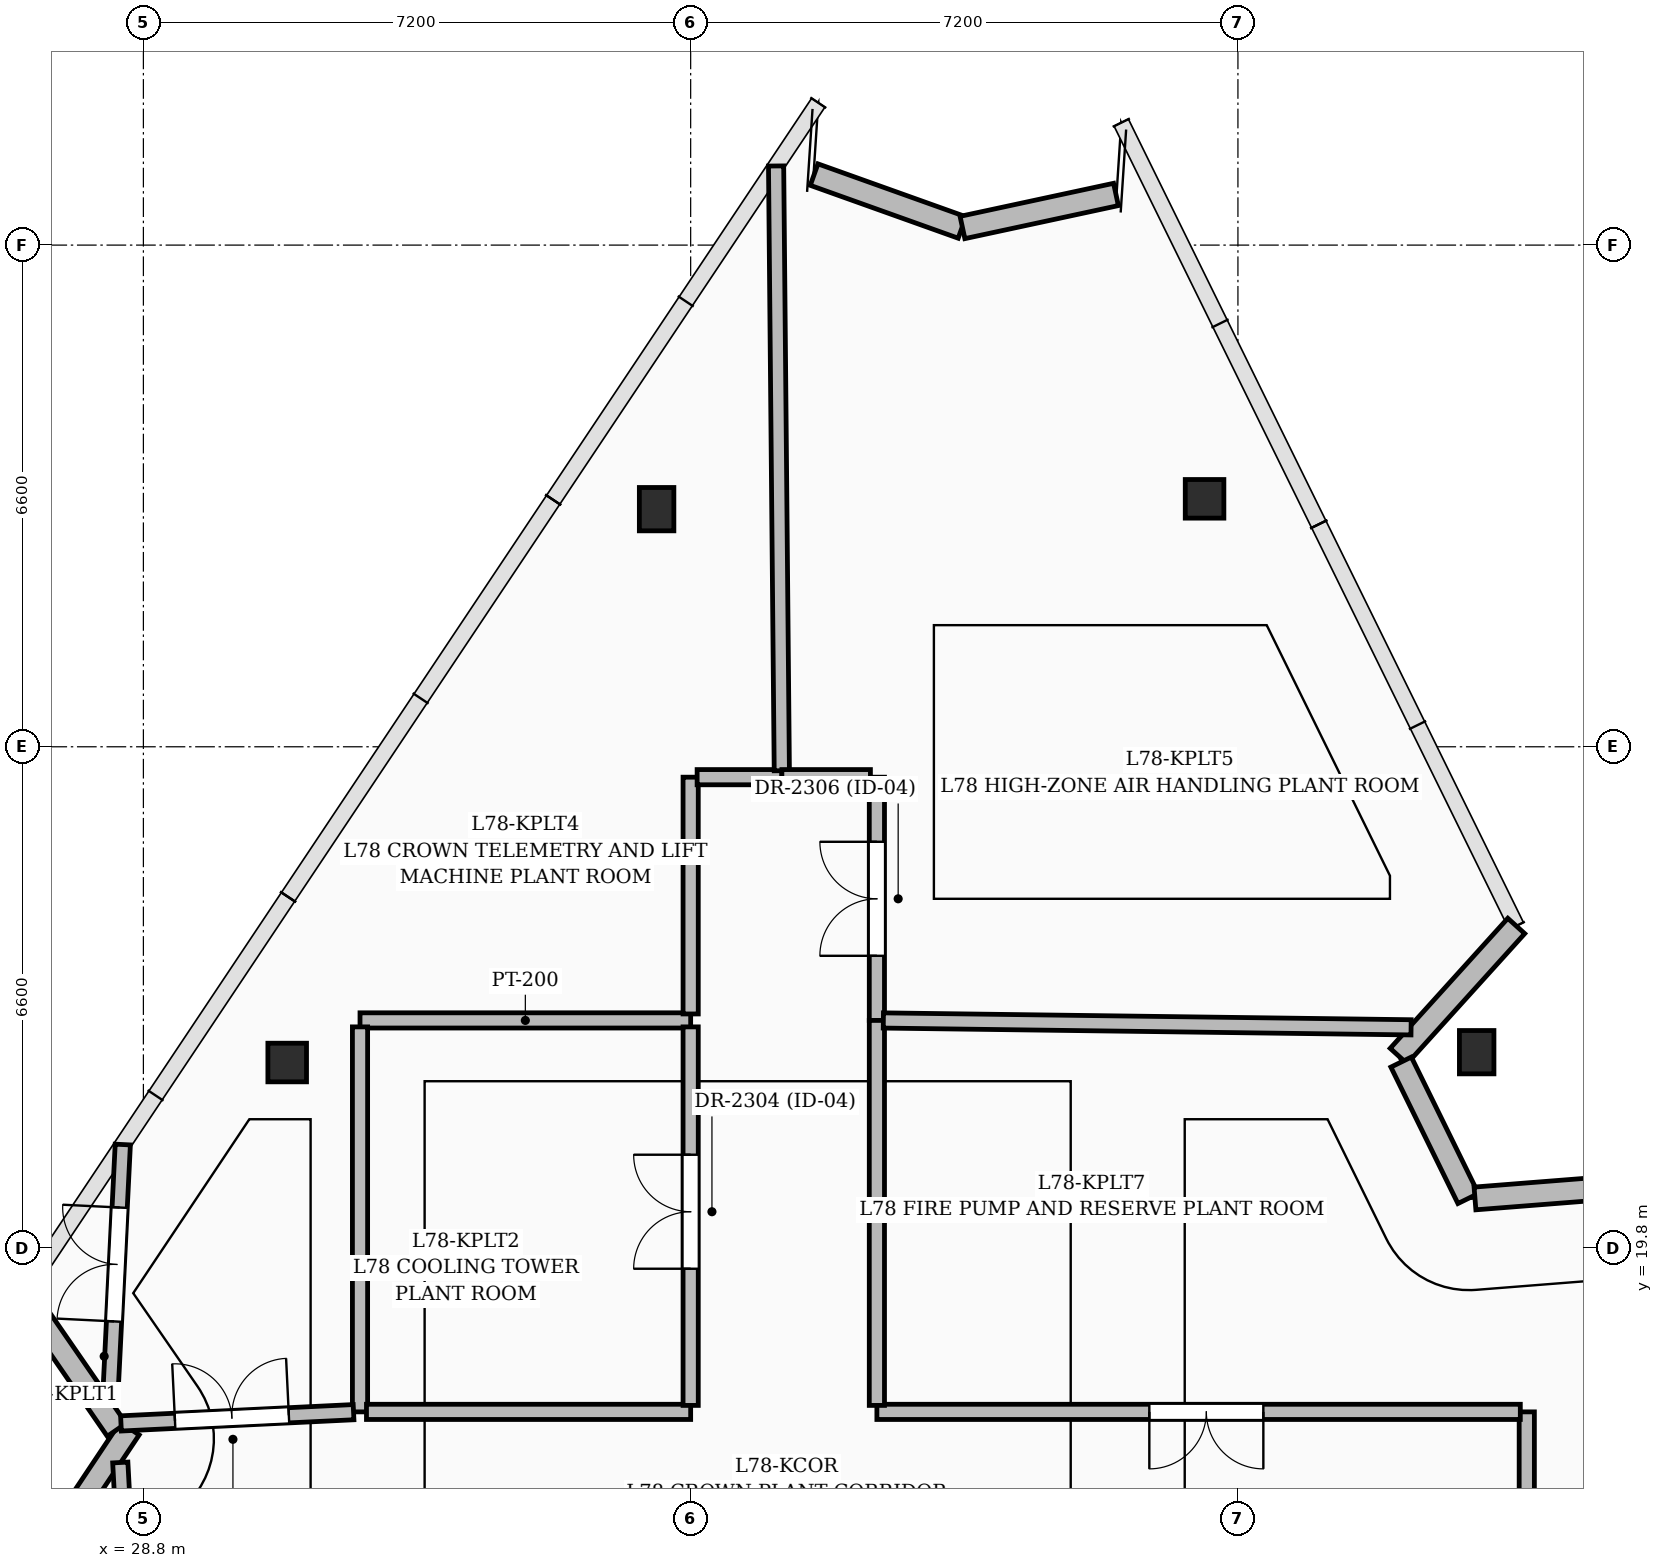
"""IFC4 building model, lengths in metres.
Left out: names, types, materials, properties, quantities, classifications, styles, units other than length and angle.
Written with IfcOpenShell. Run it as: python <this file> out.ifc"""

import sys

from ifc_helpers import new_model, si_unit, direction, frame, frame_2d, origin, origin_2d, place, context, subcontext, project, spatial, rectangle, hollow_circle, i_section, extrude, element, fill, save


model = new_model("IFC4")
c1 = context("Model", 3, precision=1e-05, world=origin(), true_north=direction((0.0, 1.0)))
c2 = subcontext(c1, "Body", "Model", "MODEL_VIEW")
j1 = project(units=[si_unit("LENGTHUNIT", "METRE"), si_unit("PLANEANGLEUNIT", "RADIAN")], contexts=[c1])
p1 = place(None, origin())
s1 = spatial("IfcSite", under=j1, at=p1, CompositionType="ELEMENT")
p2 = place(p1, origin())
s2 = spatial("IfcBuilding", under=s1, at=p2, CompositionType="ELEMENT")
p3 = place(p2, frame((0.0, 0.0, 302.5)))
s3 = spatial("IfcBuildingStorey", under=s2, at=p3, CompositionType="ELEMENT", Elevation=302.5)
p4 = place(p3, frame((46.341, 22.382, 0.0), z_axis=(0.0, 0.0, 1.0), x_axis=(1.0, 0.0, 0.0)))
e1 = element("IfcColumn", 1, at=p4, inside=s3, PredefinedType="COLUMN", context=c2, shape_type="SweptSolid", body=[
    extrude(i_section(OverallWidth=0.454, OverallDepth=0.57, WebThickness=0.078, FlangeThickness=0.094, FilletRadius=0.02, at=origin_2d()), origin(), (0.0, 0.0, 1.0), 4.0),
])
p5 = place(p3, frame((42.761, 29.662, 0.0), z_axis=(0.0, 0.0, 1.0), x_axis=(1.0, 0.0, 0.0)))
e2 = element("IfcColumn", 2, at=p5, inside=s3, PredefinedType="COLUMN", context=c2, shape_type="SweptSolid", body=[
    extrude(hollow_circle(Radius=0.254, WallThickness=0.016, at=origin_2d()), origin(), (0.0, 0.0, 1.0), 4.0),
])
p6 = place(p3, frame((35.552, 29.526, 0.0), z_axis=(0.0, 0.0, 1.0), x_axis=(1.0, 0.0, 0.0)))
e3 = element("IfcColumn", 3, at=p6, inside=s3, PredefinedType="COLUMN", context=c2, shape_type="SweptSolid", body=[
    extrude(i_section(OverallWidth=0.454, OverallDepth=0.57, WebThickness=0.078, FlangeThickness=0.094, FilletRadius=0.02, at=origin_2d()), origin(), (0.0, 0.0, 1.0), 4.0),
])
p7 = place(p3, frame((30.692, 22.246, 0.0), z_axis=(0.0, 0.0, 1.0), x_axis=(1.0, 0.0, 0.0)))
e4 = element("IfcColumn", 4, at=p7, inside=s3, PredefinedType="COLUMN", context=c2, shape_type="SweptSolid", body=[
    extrude(hollow_circle(Radius=0.254, WallThickness=0.016, at=origin_2d()), origin(), (0.0, 0.0, 1.0), 4.0),
])
p8 = place(p3, frame((27.502, 15.756, 0.0), z_axis=(0.0, 0.0, 1.0), x_axis=(0.555175962623, 0.831732920189, 0.0)))
e5 = element("IfcWall", 5, at=p8, inside=s3, PredefinedType="SOLIDWALL", context=c2, shape_type="SweptSolid", body=[
    extrude(rectangle(XDim=2.013, YDim=0.3, at=frame_2d((1.006, 0.0))), origin(), (0.0, 0.0, 1.0), 3.04),
])
p9 = place(p3, frame((28.448, 17.414, 0.0), z_axis=(0.0, 0.0, 1.0), x_axis=(-0.56781706626, 0.823154772363, 0.0)))
e6 = element("IfcWall", 6, at=p9, inside=s3, PredefinedType="SOLIDWALL", context=c2, shape_type="SweptSolid", body=[
    extrude(rectangle(XDim=2.17, YDim=0.3, at=frame_2d((1.085, 0.0))), origin(), (0.0, 0.0, 1.0), 2.982),
])
p10 = place(p3, frame((37.624, 33.927, 0.0), z_axis=(0.0, 0.0, 1.0), x_axis=(0.941672407687, -0.336530944493, 0.0)))
e7 = element("IfcWall", 7, at=p10, inside=s3, PredefinedType="SOLIDWALL", context=c2, shape_type="SweptSolid", body=[
    extrude(rectangle(XDim=2.067, YDim=0.3, at=frame_2d((1.033, 0.0))), origin(), (0.0, 0.0, 1.0), 3.7),
])
p11 = place(p3, frame((39.576, 33.232, 0.0), z_axis=(0.0, 0.0, 1.0), x_axis=(0.977608338725, 0.210432735227, 0.0)))
e8 = element("IfcWall", 8, at=p11, inside=s3, PredefinedType="SOLIDWALL", context=c2, shape_type="SweptSolid", body=[
    extrude(rectangle(XDim=2.066, YDim=0.3, at=frame_2d((1.033, 0.0))), origin(), (0.0, 0.0, 1.0), 3.7),
])
p12 = place(p3, frame((46.862, 24.043, 0.0), z_axis=(0.0, 0.0, 1.0), x_axis=(-0.670758100891, -0.741676189512, 0.0)))
e9 = element("IfcWall", 9, at=p12, inside=s3, PredefinedType="SOLIDWALL", context=c2, shape_type="SweptSolid", body=[
    extrude(rectangle(XDim=2.307, YDim=0.3, at=frame_2d((1.153, 0.0))), origin(), (0.0, 0.0, 1.0), 2.982),
])
p13 = place(p3, frame((45.347, 22.252, 0.0), z_axis=(0.0, 0.0, 1.0), x_axis=(0.441098850586, -0.897458524954, 0.0)))
e10 = element("IfcWall", 10, at=p13, inside=s3, PredefinedType="SOLIDWALL", context=c2, shape_type="SweptSolid", body=[
    extrude(rectangle(XDim=2.0, YDim=0.3, at=frame_2d((1.0, 0.0))), origin(), (0.0, 0.0, 1.0), 3.7),
])
p14 = place(p3, frame((46.319, 20.458, 0.0), z_axis=(0.0, 0.0, 1.0), x_axis=(0.996897695967, 0.078708219233, 0.0)))
e11 = element("IfcWall", 11, at=p14, inside=s3, PredefinedType="SOLIDWALL", context=c2, shape_type="SweptSolid", body=[
    extrude(rectangle(XDim=2.227, YDim=0.3, at=frame_2d((1.114, 0.0))), origin(), (0.0, 0.0, 1.0), 2.982),
])
p15 = place(p3, frame((28.362, 17.795, 0.0), z_axis=(0.0, 0.0, 1.0), x_axis=(0.049461540964, 0.99877602893, 0.0)))
e12 = element("IfcWall", 12, at=p15, inside=s3, PredefinedType="PARTITIONING", context=c2, shape_type="SweptSolid", body=[
    extrude(rectangle(XDim=3.376, YDim=0.2, at=frame_2d((1.688, 0.0))), origin(), (0.0, 0.0, 1.0), 2.977),
])
p16 = place(p15, frame((1.046, 0.0, 0.0)))
e13 = element("IfcOpeningElement", 13, at=p16, cuts=e12, PredefinedType="OPENING", context=c2, shape_type="SweptSolid", body=[
    extrude(rectangle(XDim=1.5, YDim=2.2, at=frame_2d((0.75, 1.1))), frame((0.0, 0.11, 0.0), z_axis=(0.0, -1.0, 0.0), x_axis=(1.0, 0.0, 0.0)), (0.0, 0.0, 1.0), 0.22),
])
p17 = place(p3, frame((36.0, 22.8, 0.0), z_axis=(0.0, 0.0, 1.0), x_axis=(-1.0, 0.0, 0.0)))
e14 = element("IfcWall", 14, at=p17, inside=s3, PredefinedType="PARTITIONING", context=c2, shape_type="SweptSolid", body=[
    extrude(rectangle(XDim=4.35, YDim=0.2, at=frame_2d((2.175, 0.0))), origin(), (0.0, 0.0, 1.0), 3.035),
])
p18 = place(p3, frame((31.65, 22.715, 0.0), z_axis=(0.0, 0.0, 1.0), x_axis=(0.0, -1.0, 0.0)))
e15 = element("IfcWall", 15, at=p18, inside=s3, PredefinedType="PARTITIONING", context=c2, shape_type="SweptSolid", body=[
    extrude(rectangle(XDim=5.065, YDim=0.2, at=frame_2d((2.533, 0.0))), origin(), (0.0, 0.0, 1.0), 3.121),
])
p19 = place(p3, frame((31.735, 17.65, 0.0), z_axis=(0.0, 0.0, 1.0), x_axis=(1.0, 0.0, 0.0)))
e16 = element("IfcWall", 16, at=p19, inside=s3, PredefinedType="PARTITIONING", context=c2, shape_type="SweptSolid", body=[
    extrude(rectangle(XDim=4.265, YDim=0.2, at=frame_2d((2.132, 0.0))), origin(), (0.0, 0.0, 1.0), 3.035),
])
p20 = place(p3, frame((36.0, 17.735, 0.0), z_axis=(0.0, 0.0, 1.0), x_axis=(0.0, 1.0, 0.0)))
e17 = element("IfcWall", 17, at=p20, inside=s3, PredefinedType="PARTITIONING", context=c2, shape_type="SweptSolid", body=[
    extrude(rectangle(XDim=4.98, YDim=0.2, at=frame_2d((2.49, 0.0))), origin(), (0.0, 0.0, 1.0), 3.121),
])
p21 = place(p20, frame((1.798, 0.0, 0.0)))
e18 = element("IfcOpeningElement", 18, at=p21, cuts=e17, PredefinedType="OPENING", context=c2, shape_type="SweptSolid", body=[
    extrude(rectangle(XDim=1.5, YDim=2.2, at=frame_2d((0.75, 1.1))), frame((0.0, 0.11, 0.0), z_axis=(0.0, -1.0, 0.0), x_axis=(1.0, 0.0, 0.0)), (0.0, 0.0, 1.0), 0.22),
])
p22 = place(p3, frame((28.505, 17.498, 0.0), z_axis=(0.0, 0.0, 1.0), x_axis=(0.998829596157, 0.04836773553, 0.0)))
e19 = element("IfcWall", 19, at=p22, inside=s3, PredefinedType="PARTITIONING", context=c2, shape_type="SweptSolid", body=[
    extrude(rectangle(XDim=3.064, YDim=0.2, at=frame_2d((1.532, 0.0))), origin(), (0.0, 0.0, 1.0), 3.035),
])
p23 = place(p22, frame((0.711, 0.0, 0.0)))
e20 = element("IfcOpeningElement", 20, at=p23, cuts=e19, PredefinedType="OPENING", context=c2, shape_type="SweptSolid", body=[
    extrude(rectangle(XDim=1.5, YDim=2.2, at=frame_2d((0.75, 1.1))), frame((0.0, 0.11, 0.0), z_axis=(0.0, -1.0, 0.0), x_axis=(1.0, 0.0, 0.0)), (0.0, 0.0, 1.0), 0.22),
])
p24 = place(p3, frame((36.0, 22.885, 0.0), z_axis=(0.0, 0.0, 1.0), x_axis=(0.0, 1.0, 0.0)))
e21 = element("IfcWall", 21, at=p24, inside=s3, PredefinedType="PARTITIONING", context=c2, shape_type="SweptSolid", body=[
    extrude(rectangle(XDim=3.115, YDim=0.2, at=frame_2d((1.558, 0.0))), origin(), (0.0, 0.0, 1.0), 3.121),
])
p25 = place(p3, frame((36.085, 26.0, 0.0), z_axis=(0.0, 0.0, 1.0), x_axis=(1.0, 0.0, 0.0)))
e22 = element("IfcWall", 22, at=p25, inside=s3, PredefinedType="PARTITIONING", context=c2, shape_type="SweptSolid", body=[
    extrude(rectangle(XDim=1.115, YDim=0.2, at=frame_2d((0.558, 0.0))), origin(), (0.0, 0.0, 1.0), 3.7),
])
p26 = place(p3, frame((37.199, 26.085, 0.0), z_axis=(0.0, 0.0, 1.0), x_axis=(-0.009450909674, 0.999955339156, 0.0)))
e23 = element("IfcWall", 23, at=p26, inside=s3, PredefinedType="PARTITIONING", context=c2, shape_type="SweptSolid", body=[
    extrude(rectangle(XDim=7.956, YDim=0.2, at=frame_2d((3.978, 0.0))), origin(), (0.0, 0.0, 1.0), 2.977),
])
p27 = place(p3, frame((38.45, 22.8, 0.0), z_axis=(0.0, 0.0, 1.0), x_axis=(0.0, 1.0, 0.0)))
e24 = element("IfcWall", 24, at=p27, inside=s3, PredefinedType="PARTITIONING", context=c2, shape_type="SweptSolid", body=[
    extrude(rectangle(XDim=3.2, YDim=0.2, at=frame_2d((1.6, 0.0))), origin(), (0.0, 0.0, 1.0), 3.121),
])
p28 = place(p27, frame((0.85, 0.0, 0.0)))
e25 = element("IfcOpeningElement", 25, at=p28, cuts=e24, PredefinedType="OPENING", context=c2, shape_type="SweptSolid", body=[
    extrude(rectangle(XDim=1.5, YDim=2.2, at=frame_2d((0.75, 1.1))), frame((0.0, 0.11, 0.0), z_axis=(0.0, -1.0, 0.0), x_axis=(1.0, 0.0, 0.0)), (0.0, 0.0, 1.0), 0.22),
])
p29 = place(p3, frame((38.365, 26.0, 0.0), z_axis=(0.0, 0.0, 1.0), x_axis=(-1.0, 0.0, 0.0)))
e26 = element("IfcWall", 26, at=p29, inside=s3, PredefinedType="PARTITIONING", context=c2, shape_type="SweptSolid", body=[
    extrude(rectangle(XDim=1.165, YDim=0.2, at=frame_2d((0.583, 0.0))), origin(), (0.0, 0.0, 1.0), 3.7),
])
p30 = place(p3, frame((28.496, 16.984, 0.0), z_axis=(0.0, 0.0, 1.0), x_axis=(0.053703478209, -0.998556926984, 0.0)))
e27 = element("IfcWall", 27, at=p30, inside=s3, PredefinedType="PARTITIONING", context=c2, shape_type="SweptSolid", body=[
    extrude(rectangle(XDim=1.937, YDim=0.2, at=frame_2d((0.968, 0.0))), origin(), (0.0, 0.0, 1.0), 3.035),
])
p31 = place(p3, frame((47.0, 15.05, 0.0), z_axis=(0.0, 0.0, 1.0), x_axis=(0.0, 1.0, 0.0)))
e28 = element("IfcWall", 28, at=p31, inside=s3, PredefinedType="PARTITIONING", context=c2, shape_type="SweptSolid", body=[
    extrude(rectangle(XDim=2.6, YDim=0.2, at=frame_2d((1.3, 0.0))), origin(), (0.0, 0.0, 1.0), 3.035),
])
p32 = place(p3, frame((46.915, 17.65, 0.0), z_axis=(0.0, 0.0, 1.0), x_axis=(-1.0, 0.0, 0.0)))
e29 = element("IfcWall", 29, at=p32, inside=s3, PredefinedType="PARTITIONING", context=c2, shape_type="SweptSolid", body=[
    extrude(rectangle(XDim=8.465, YDim=0.2, at=frame_2d((4.232, 0.0))), origin(), (0.0, 0.0, 1.0), 3.035),
])
p33 = place(p32, frame((3.381, 0.0, 0.0)))
e30 = element("IfcOpeningElement", 30, at=p33, cuts=e29, PredefinedType="OPENING", context=c2, shape_type="SweptSolid", body=[
    extrude(rectangle(XDim=1.5, YDim=2.2, at=frame_2d((0.75, 1.1))), frame((0.0, 0.11, 0.0), z_axis=(0.0, -1.0, 0.0), x_axis=(1.0, 0.0, 0.0)), (0.0, 0.0, 1.0), 0.22),
])
p34 = place(p3, frame((38.45, 17.735, 0.0), z_axis=(0.0, 0.0, 1.0), x_axis=(0.0, 1.0, 0.0)))
e31 = element("IfcWall", 31, at=p34, inside=s3, PredefinedType="PARTITIONING", context=c2, shape_type="SweptSolid", body=[
    extrude(rectangle(XDim=5.065, YDim=0.2, at=frame_2d((2.532, 0.0))), origin(), (0.0, 0.0, 1.0), 3.035),
])
p35 = place(p3, frame((38.535, 22.799, 0.0), z_axis=(0.0, 0.0, 1.0), x_axis=(0.999915376754, -0.013009201779, 0.0)))
e32 = element("IfcWall", 32, at=p35, inside=s3, PredefinedType="PARTITIONING", context=c2, shape_type="SweptSolid", body=[
    extrude(rectangle(XDim=6.944, YDim=0.2, at=frame_2d((3.472, 0.0))), origin(), (0.0, 0.0, 1.0), 3.035),
])
p36 = place(p21, origin())
e33 = element("IfcDoor", 33, at=p36, inside=s3, OperationType="DOUBLE_DOOR_SINGLE_SWING", PredefinedType="DOOR", context=c2, shape_type="SweptSolid", body=[
    extrude(rectangle(XDim=1.5, YDim=2.2, at=frame_2d((0.75, 1.1))), frame((0.0, 0.025, 0.0), z_axis=(0.0, -1.0, 0.0), x_axis=(1.0, 0.0, 0.0)), (0.0, 0.0, 1.0), 0.05),
])
fill(e18, e33)
p37 = place(p23, origin())
e34 = element("IfcDoor", 34, at=p37, inside=s3, OperationType="DOUBLE_DOOR_SINGLE_SWING", PredefinedType="DOOR", context=c2, shape_type="SweptSolid", body=[
    extrude(rectangle(XDim=1.5, YDim=2.2, at=frame_2d((0.75, 1.1))), frame((0.0, 0.025, 0.0), z_axis=(0.0, -1.0, 0.0), x_axis=(1.0, 0.0, 0.0)), (0.0, 0.0, 1.0), 0.05),
])
fill(e20, e34)
p38 = place(p28, origin())
e35 = element("IfcDoor", 35, at=p38, inside=s3, OperationType="DOUBLE_DOOR_SINGLE_SWING", PredefinedType="DOOR", context=c2, shape_type="SweptSolid", body=[
    extrude(rectangle(XDim=1.5, YDim=2.2, at=frame_2d((0.75, 1.1))), frame((0.0, 0.025, 0.0), z_axis=(0.0, -1.0, 0.0), x_axis=(1.0, 0.0, 0.0)), (0.0, 0.0, 1.0), 0.05),
])
fill(e25, e35)
p39 = place(p33, origin())
e36 = element("IfcDoor", 36, at=p39, inside=s3, OperationType="DOUBLE_DOOR_SINGLE_SWING", PredefinedType="DOOR", context=c2, shape_type="SweptSolid", body=[
    extrude(rectangle(XDim=1.5, YDim=2.2, at=frame_2d((0.75, 1.1))), frame((0.0, 0.025, 0.0), z_axis=(0.0, -1.0, 0.0), x_axis=(1.0, 0.0, 0.0)), (0.0, 0.0, 1.0), 0.05),
])
fill(e30, e36)
p40 = place(p16, origin())
e37 = element("IfcDoor", 37, at=p40, inside=s3, OperationType="DOUBLE_DOOR_SINGLE_SWING", PredefinedType="DOOR", context=c2, shape_type="SweptSolid", body=[
    extrude(rectangle(XDim=1.5, YDim=2.2, at=frame_2d((0.75, 1.1))), frame((0.0, 0.025, 0.0), z_axis=(0.0, -1.0, 0.0), x_axis=(1.0, 0.0, 0.0)), (0.0, 0.0, 1.0), 0.05),
])
fill(e13, e37)
save(model, sys.argv[1])
